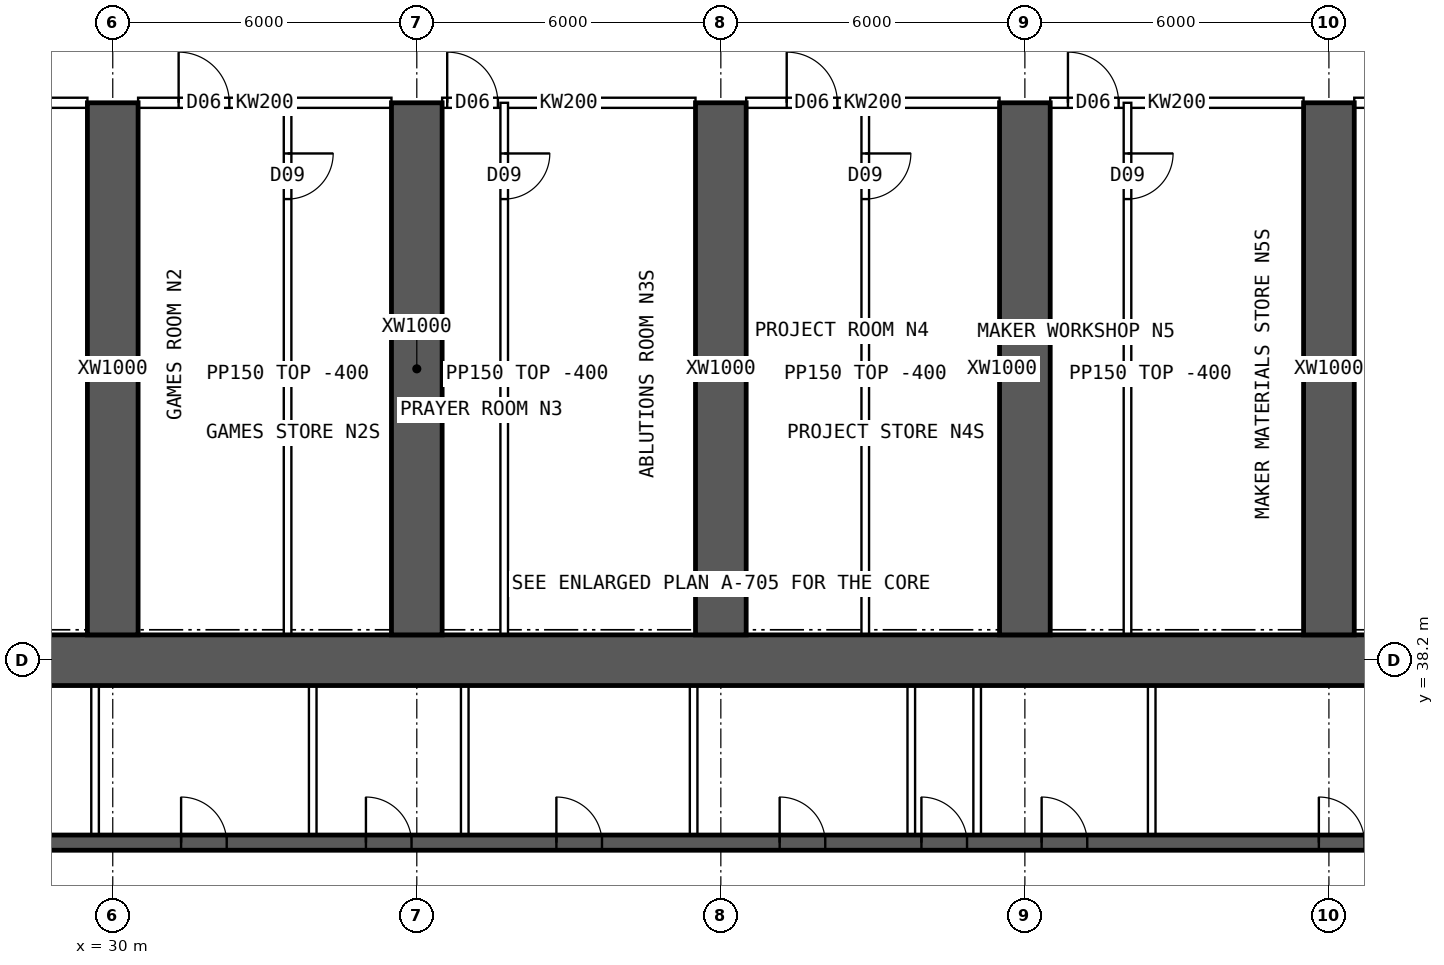
"""IFC4 building model, lengths in metres.
Left out: names, types, materials, properties, quantities, classifications, styles, units other than length and angle.
Written with IfcOpenShell. Run it as: python <this file> out.ifc"""

import sys

from ifc_helpers import new_model, si_unit, direction, frame, frame_2d, origin, place, context, subcontext, project, spatial, rectangle, extrude, element, fill, save


model = new_model("IFC4")
c1 = context("Model", 3, precision=1e-05, world=origin(), true_north=direction((0.0, 1.0)))
c2 = subcontext(c1, "Body", "Model", "MODEL_VIEW")
j1 = project(units=[si_unit("LENGTHUNIT", "METRE"), si_unit("PLANEANGLEUNIT", "RADIAN")], contexts=[c1])
p1 = place(None, origin())
s1 = spatial("IfcSite", under=j1, at=p1, CompositionType="ELEMENT")
p2 = place(p1, origin())
s2 = spatial("IfcBuilding", under=s1, at=p2, CompositionType="ELEMENT")
p3 = place(p2, frame((0.0, 0.0, 11.0)))
s3 = spatial("IfcBuildingStorey", under=s2, at=p3, CompositionType="ELEMENT", Elevation=11.0)
p4 = place(p3, frame((18.0, 38.2, 0.0), z_axis=(0.0, 0.0, 1.0), x_axis=(1.0, 0.0, 0.0)))
e1 = element("IfcWall", 1, at=p4, inside=s3, PredefinedType="SHEAR", context=c2, shape_type="SweptSolid", body=[
    extrude(rectangle(XDim=48.0, YDim=1.0, at=frame_2d((24.0, 0.0))), origin(), (0.0, 0.0, 1.0), 5.0),
])
p5 = place(p3, frame((18.5, 34.6, 0.0), z_axis=(0.0, 0.0, 1.0), x_axis=(1.0, 0.0, 0.0)))
e2 = element("IfcWall", 2, at=p5, inside=s3, PredefinedType="SHEAR", context=c2, shape_type="SweptSolid", body=[
    extrude(rectangle(XDim=47.0, YDim=0.3, at=frame_2d((23.5, 0.0))), origin(), (0.0, 0.0, 1.0), 5.0),
])
p6 = place(p5, frame((0.9, 0.0, 0.0)))
e3 = element("IfcOpeningElement", 3, at=p6, cuts=e2, PredefinedType="OPENING", context=c2, shape_type="SweptSolid", body=[
    extrude(rectangle(XDim=1.1, YDim=2.1, at=frame_2d((0.55, 1.05))), frame((0.0, 0.16, 0.0), z_axis=(0.0, -1.0, 0.0), x_axis=(1.0, 0.0, 0.0)), (0.0, 0.0, 1.0), 0.32),
])
p7 = place(p5, frame((45.0, 0.0, 0.0)))
e4 = element("IfcOpeningElement", 4, at=p7, cuts=e2, PredefinedType="OPENING", context=c2, shape_type="SweptSolid", body=[
    extrude(rectangle(XDim=1.1, YDim=2.1, at=frame_2d((0.55, 1.05))), frame((0.0, 0.16, 0.0), z_axis=(0.0, -1.0, 0.0), x_axis=(1.0, 0.0, 0.0)), (0.0, 0.0, 1.0), 0.32),
])
p8 = place(p5, frame((4.1, 0.0, 0.0)))
e5 = element("IfcOpeningElement", 5, at=p8, cuts=e2, PredefinedType="OPENING", context=c2, shape_type="SweptSolid", body=[
    extrude(rectangle(XDim=0.9, YDim=2.1, at=frame_2d((0.45, 1.05))), frame((0.0, 0.16, 0.0), z_axis=(0.0, -1.0, 0.0), x_axis=(1.0, 0.0, 0.0)), (0.0, 0.0, 1.0), 0.32),
])
p9 = place(p5, frame((42.0, 0.0, 0.0)))
e6 = element("IfcOpeningElement", 6, at=p9, cuts=e2, PredefinedType="OPENING", context=c2, shape_type="SweptSolid", body=[
    extrude(rectangle(XDim=0.9, YDim=2.1, at=frame_2d((0.45, 1.05))), frame((0.0, 0.16, 0.0), z_axis=(0.0, -1.0, 0.0), x_axis=(1.0, 0.0, 0.0)), (0.0, 0.0, 1.0), 0.32),
])
p10 = place(p5, frame((8.875, 0.0, 0.0)))
e7 = element("IfcOpeningElement", 7, at=p10, cuts=e2, PredefinedType="OPENING", context=c2, shape_type="SweptSolid", body=[
    extrude(rectangle(XDim=0.9, YDim=2.1, at=frame_2d((0.45, 1.05))), frame((0.0, 0.16, 0.0), z_axis=(0.0, -1.0, 0.0), x_axis=(1.0, 0.0, 0.0)), (0.0, 0.0, 1.0), 0.32),
])
p11 = place(p5, frame((12.849, 0.0, 0.0)))
e8 = element("IfcOpeningElement", 8, at=p11, cuts=e2, PredefinedType="OPENING", context=c2, shape_type="SweptSolid", body=[
    extrude(rectangle(XDim=0.9, YDim=2.1, at=frame_2d((0.45, 1.05))), frame((0.0, 0.16, 0.0), z_axis=(0.0, -1.0, 0.0), x_axis=(1.0, 0.0, 0.0)), (0.0, 0.0, 1.0), 0.32),
])
p12 = place(p5, frame((16.496, 0.0, 0.0)))
e9 = element("IfcOpeningElement", 9, at=p12, cuts=e2, PredefinedType="OPENING", context=c2, shape_type="SweptSolid", body=[
    extrude(rectangle(XDim=0.9, YDim=2.1, at=frame_2d((0.45, 1.05))), frame((0.0, 0.16, 0.0), z_axis=(0.0, -1.0, 0.0), x_axis=(1.0, 0.0, 0.0)), (0.0, 0.0, 1.0), 0.32),
])
p13 = place(p5, frame((20.255, 0.0, 0.0)))
e10 = element("IfcOpeningElement", 10, at=p13, cuts=e2, PredefinedType="OPENING", context=c2, shape_type="SweptSolid", body=[
    extrude(rectangle(XDim=0.9, YDim=2.1, at=frame_2d((0.45, 1.05))), frame((0.0, 0.16, 0.0), z_axis=(0.0, -1.0, 0.0), x_axis=(1.0, 0.0, 0.0)), (0.0, 0.0, 1.0), 0.32),
])
p14 = place(p5, frame((24.661, 0.0, 0.0)))
e11 = element("IfcOpeningElement", 11, at=p14, cuts=e2, PredefinedType="OPENING", context=c2, shape_type="SweptSolid", body=[
    extrude(rectangle(XDim=0.9, YDim=2.1, at=frame_2d((0.45, 1.05))), frame((0.0, 0.16, 0.0), z_axis=(0.0, -1.0, 0.0), x_axis=(1.0, 0.0, 0.0)), (0.0, 0.0, 1.0), 0.32),
])
p15 = place(p5, frame((27.458, 0.0, 0.0)))
e12 = element("IfcOpeningElement", 12, at=p15, cuts=e2, PredefinedType="OPENING", context=c2, shape_type="SweptSolid", body=[
    extrude(rectangle(XDim=0.9, YDim=2.1, at=frame_2d((0.45, 1.05))), frame((0.0, 0.16, 0.0), z_axis=(0.0, -1.0, 0.0), x_axis=(1.0, 0.0, 0.0)), (0.0, 0.0, 1.0), 0.32),
])
p16 = place(p5, frame((29.831, 0.0, 0.0)))
e13 = element("IfcOpeningElement", 13, at=p16, cuts=e2, PredefinedType="OPENING", context=c2, shape_type="SweptSolid", body=[
    extrude(rectangle(XDim=0.9, YDim=2.1, at=frame_2d((0.45, 1.05))), frame((0.0, 0.16, 0.0), z_axis=(0.0, -1.0, 0.0), x_axis=(1.0, 0.0, 0.0)), (0.0, 0.0, 1.0), 0.32),
])
p17 = place(p5, frame((35.302, 0.0, 0.0)))
e14 = element("IfcOpeningElement", 14, at=p17, cuts=e2, PredefinedType="OPENING", context=c2, shape_type="SweptSolid", body=[
    extrude(rectangle(XDim=0.9, YDim=2.1, at=frame_2d((0.45, 1.05))), frame((0.0, 0.16, 0.0), z_axis=(0.0, -1.0, 0.0), x_axis=(1.0, 0.0, 0.0)), (0.0, 0.0, 1.0), 0.32),
])
for number, where, z_axis, x_axis in (
    (15, (30.0, 38.7, 0.0), (0.0, 0.0, 1.0), (0.0, 1.0, 0.0)),
    (16, (36.0, 38.7, 0.0), (0.0, 0.0, 1.0), (0.0, 1.0, 0.0)),
    (17, (42.0, 38.7, 0.0), (0.0, 0.0, 1.0), (0.0, 1.0, 0.0)),
    (18, (48.0, 38.7, 0.0), (0.0, 0.0, 1.0), (0.0, 1.0, 0.0)),
    (19, (54.0, 38.7, 0.0), (0.0, 0.0, 1.0), (0.0, 1.0, 0.0)),
):
    element("IfcWall", number, at=place(p3, frame(where, z_axis=z_axis, x_axis=x_axis)), inside=s3, PredefinedType="SHEAR", context=c2, shape_type="SweptSolid", body=[
        extrude(rectangle(XDim=10.5, YDim=1.0, at=frame_2d((5.25, 0.0))), origin(), (0.0, 0.0, 1.0), 5.0),
    ])
for number, where, z_axis, x_axis in (
    (20, (29.651, 34.75, 0.0), (0.0, 0.0, 1.0), (0.0, 1.0, 0.0)),
    (21, (33.946, 34.75, 0.0), (0.0, 0.0, 1.0), (0.0, 1.0, 0.0)),
    (22, (36.946, 34.75, 0.0), (0.0, 0.0, 1.0), (0.0, 1.0, 0.0)),
    (23, (41.463, 34.75, 0.0), (0.0, 0.0, 1.0), (0.0, 1.0, 0.0)),
    (24, (45.758, 34.75, 0.0), (0.0, 0.0, 1.0), (0.0, 1.0, 0.0)),
    (25, (47.058, 34.75, 0.0), (0.0, 0.0, 1.0), (0.0, 1.0, 0.0)),
    (26, (50.503, 34.75, 0.0), (0.0, 0.0, 1.0), (0.0, 1.0, 0.0)),
):
    element("IfcWall", number, at=place(p3, frame(where, z_axis=z_axis, x_axis=x_axis)), inside=s3, PredefinedType="SOLIDWALL", context=c2, shape_type="SweptSolid", body=[
        extrude(rectangle(XDim=2.95, YDim=0.15, at=frame_2d((1.475, 0.0))), origin(), (0.0, 0.0, 1.0), 4.6),
    ])
p18 = place(p3, frame((33.45, 38.5, 0.0), z_axis=(0.0, 0.0, 1.0), x_axis=(0.0, 1.0, 0.0)))
e27 = element("IfcWall", 27, at=p18, inside=s3, PredefinedType="PARTITIONING", context=c2, shape_type="SweptSolid", body=[
    extrude(rectangle(XDim=10.7, YDim=0.15, at=frame_2d((5.35, 0.0))), origin(), (0.0, 0.0, 1.0), 4.6),
])
p19 = place(p18, frame((8.8, 0.0, 0.0)))
e28 = element("IfcOpeningElement", 28, at=p19, cuts=e27, PredefinedType="OPENING", context=c2, shape_type="SweptSolid", body=[
    extrude(rectangle(XDim=0.9, YDim=2.1, at=frame_2d((0.45, 1.05))), frame((0.0, 0.085, 0.0), z_axis=(0.0, -1.0, 0.0), x_axis=(1.0, 0.0, 0.0)), (0.0, 0.0, 1.0), 0.17),
])
p20 = place(p3, frame((37.725, 38.5, 0.0), z_axis=(0.0, 0.0, 1.0), x_axis=(0.0, 1.0, 0.0)))
e29 = element("IfcWall", 29, at=p20, inside=s3, PredefinedType="PARTITIONING", context=c2, shape_type="SweptSolid", body=[
    extrude(rectangle(XDim=10.7, YDim=0.15, at=frame_2d((5.35, 0.0))), origin(), (0.0, 0.0, 1.0), 4.6),
])
p21 = place(p20, frame((8.8, 0.0, 0.0)))
e30 = element("IfcOpeningElement", 30, at=p21, cuts=e29, PredefinedType="OPENING", context=c2, shape_type="SweptSolid", body=[
    extrude(rectangle(XDim=0.9, YDim=2.1, at=frame_2d((0.45, 1.05))), frame((0.0, 0.085, 0.0), z_axis=(0.0, -1.0, 0.0), x_axis=(1.0, 0.0, 0.0)), (0.0, 0.0, 1.0), 0.17),
])
p22 = place(p3, frame((44.85, 38.5, 0.0), z_axis=(0.0, 0.0, 1.0), x_axis=(0.0, 1.0, 0.0)))
e31 = element("IfcWall", 31, at=p22, inside=s3, PredefinedType="PARTITIONING", context=c2, shape_type="SweptSolid", body=[
    extrude(rectangle(XDim=10.7, YDim=0.15, at=frame_2d((5.35, 0.0))), origin(), (0.0, 0.0, 1.0), 4.6),
])
p23 = place(p22, frame((8.8, 0.0, 0.0)))
e32 = element("IfcOpeningElement", 32, at=p23, cuts=e31, PredefinedType="OPENING", context=c2, shape_type="SweptSolid", body=[
    extrude(rectangle(XDim=0.9, YDim=2.1, at=frame_2d((0.45, 1.05))), frame((0.0, 0.085, 0.0), z_axis=(0.0, -1.0, 0.0), x_axis=(1.0, 0.0, 0.0)), (0.0, 0.0, 1.0), 0.17),
])
p24 = place(p3, frame((50.025, 38.5, 0.0), z_axis=(0.0, 0.0, 1.0), x_axis=(0.0, 1.0, 0.0)))
e33 = element("IfcWall", 33, at=p24, inside=s3, PredefinedType="PARTITIONING", context=c2, shape_type="SweptSolid", body=[
    extrude(rectangle(XDim=10.7, YDim=0.15, at=frame_2d((5.35, 0.0))), origin(), (0.0, 0.0, 1.0), 4.6),
])
p25 = place(p24, frame((8.8, 0.0, 0.0)))
e34 = element("IfcOpeningElement", 34, at=p25, cuts=e33, PredefinedType="OPENING", context=c2, shape_type="SweptSolid", body=[
    extrude(rectangle(XDim=0.9, YDim=2.1, at=frame_2d((0.45, 1.05))), frame((0.0, 0.085, 0.0), z_axis=(0.0, -1.0, 0.0), x_axis=(1.0, 0.0, 0.0)), (0.0, 0.0, 1.0), 0.17),
])
p26 = place(p3, frame((24.5, 49.2, 0.0), z_axis=(0.0, 0.0, 1.0), x_axis=(1.0, 0.0, 0.0)))
e35 = element("IfcWall", 35, at=p26, inside=s3, PredefinedType="SOLIDWALL", context=c2, shape_type="SweptSolid", body=[
    extrude(rectangle(XDim=5.0, YDim=0.2, at=frame_2d((2.5, 0.0))), origin(), (0.0, 0.0, 1.0), 4.6),
])
p27 = place(p26, frame((0.575, 0.0, 0.0)))
e36 = element("IfcOpeningElement", 36, at=p27, cuts=e35, PredefinedType="OPENING", context=c2, shape_type="SweptSolid", body=[
    extrude(rectangle(XDim=1.0, YDim=2.1, at=frame_2d((0.5, 1.05))), frame((0.0, 0.11, 0.0), z_axis=(0.0, -1.0, 0.0), x_axis=(1.0, 0.0, 0.0)), (0.0, 0.0, 1.0), 0.22),
])
p28 = place(p3, frame((30.5, 49.2, 0.0), z_axis=(0.0, 0.0, 1.0), x_axis=(1.0, 0.0, 0.0)))
e37 = element("IfcWall", 37, at=p28, inside=s3, PredefinedType="SOLIDWALL", context=c2, shape_type="SweptSolid", body=[
    extrude(rectangle(XDim=5.0, YDim=0.2, at=frame_2d((2.5, 0.0))), origin(), (0.0, 0.0, 1.0), 4.6),
])
p29 = place(p28, frame((0.8, 0.0, 0.0)))
e38 = element("IfcOpeningElement", 38, at=p29, cuts=e37, PredefinedType="OPENING", context=c2, shape_type="SweptSolid", body=[
    extrude(rectangle(XDim=1.0, YDim=2.1, at=frame_2d((0.5, 1.05))), frame((0.0, 0.11, 0.0), z_axis=(0.0, -1.0, 0.0), x_axis=(1.0, 0.0, 0.0)), (0.0, 0.0, 1.0), 0.22),
])
p30 = place(p3, frame((36.5, 49.2, 0.0), z_axis=(0.0, 0.0, 1.0), x_axis=(1.0, 0.0, 0.0)))
e39 = element("IfcWall", 39, at=p30, inside=s3, PredefinedType="SOLIDWALL", context=c2, shape_type="SweptSolid", body=[
    extrude(rectangle(XDim=5.0, YDim=0.2, at=frame_2d((2.5, 0.0))), origin(), (0.0, 0.0, 1.0), 4.6),
])
p31 = place(p30, frame((0.1, 0.0, 0.0)))
e40 = element("IfcOpeningElement", 40, at=p31, cuts=e39, PredefinedType="OPENING", context=c2, shape_type="SweptSolid", body=[
    extrude(rectangle(XDim=1.0, YDim=2.1, at=frame_2d((0.5, 1.05))), frame((0.0, 0.11, 0.0), z_axis=(0.0, -1.0, 0.0), x_axis=(1.0, 0.0, 0.0)), (0.0, 0.0, 1.0), 0.22),
])
p32 = place(p3, frame((42.5, 49.2, 0.0), z_axis=(0.0, 0.0, 1.0), x_axis=(1.0, 0.0, 0.0)))
e41 = element("IfcWall", 41, at=p32, inside=s3, PredefinedType="SOLIDWALL", context=c2, shape_type="SweptSolid", body=[
    extrude(rectangle(XDim=5.0, YDim=0.2, at=frame_2d((2.5, 0.0))), origin(), (0.0, 0.0, 1.0), 4.6),
])
p33 = place(p32, frame((0.8, 0.0, 0.0)))
e42 = element("IfcOpeningElement", 42, at=p33, cuts=e41, PredefinedType="OPENING", context=c2, shape_type="SweptSolid", body=[
    extrude(rectangle(XDim=1.0, YDim=2.1, at=frame_2d((0.5, 1.05))), frame((0.0, 0.11, 0.0), z_axis=(0.0, -1.0, 0.0), x_axis=(1.0, 0.0, 0.0)), (0.0, 0.0, 1.0), 0.22),
])
p34 = place(p3, frame((48.5, 49.2, 0.0), z_axis=(0.0, 0.0, 1.0), x_axis=(1.0, 0.0, 0.0)))
e43 = element("IfcWall", 43, at=p34, inside=s3, PredefinedType="SOLIDWALL", context=c2, shape_type="SweptSolid", body=[
    extrude(rectangle(XDim=5.0, YDim=0.2, at=frame_2d((2.5, 0.0))), origin(), (0.0, 0.0, 1.0), 4.6),
])
p35 = place(p34, frame((0.35, 0.0, 0.0)))
e44 = element("IfcOpeningElement", 44, at=p35, cuts=e43, PredefinedType="OPENING", context=c2, shape_type="SweptSolid", body=[
    extrude(rectangle(XDim=1.0, YDim=2.1, at=frame_2d((0.5, 1.05))), frame((0.0, 0.11, 0.0), z_axis=(0.0, -1.0, 0.0), x_axis=(1.0, 0.0, 0.0)), (0.0, 0.0, 1.0), 0.22),
])
p36 = place(p3, frame((54.5, 49.2, 0.0), z_axis=(0.0, 0.0, 1.0), x_axis=(1.0, 0.0, 0.0)))
e45 = element("IfcWall", 45, at=p36, inside=s3, PredefinedType="SOLIDWALL", context=c2, shape_type="SweptSolid", body=[
    extrude(rectangle(XDim=5.0, YDim=0.2, at=frame_2d((2.5, 0.0))), origin(), (0.0, 0.0, 1.0), 4.6),
])
p37 = place(p36, frame((0.8, 0.0, 0.0)))
e46 = element("IfcOpeningElement", 46, at=p37, cuts=e45, PredefinedType="OPENING", context=c2, shape_type="SweptSolid", body=[
    extrude(rectangle(XDim=1.0, YDim=2.1, at=frame_2d((0.5, 1.05))), frame((0.0, 0.11, 0.0), z_axis=(0.0, -1.0, 0.0), x_axis=(1.0, 0.0, 0.0)), (0.0, 0.0, 1.0), 0.22),
])
p38 = place(p11, origin())
e47 = element("IfcDoor", 47, at=p38, inside=s3, OperationType="SINGLE_SWING_LEFT", PredefinedType="DOOR", context=c2, shape_type="SweptSolid", body=[
    extrude(rectangle(XDim=0.9, YDim=2.1, at=frame_2d((0.45, 1.05))), frame((0.0, 0.025, 0.0), z_axis=(0.0, -1.0, 0.0), x_axis=(1.0, 0.0, 0.0)), (0.0, 0.0, 1.0), 0.05),
])
fill(e8, e47)
p39 = place(p12, origin())
e48 = element("IfcDoor", 48, at=p39, inside=s3, OperationType="SINGLE_SWING_LEFT", PredefinedType="DOOR", context=c2, shape_type="SweptSolid", body=[
    extrude(rectangle(XDim=0.9, YDim=2.1, at=frame_2d((0.45, 1.05))), frame((0.0, 0.025, 0.0), z_axis=(0.0, -1.0, 0.0), x_axis=(1.0, 0.0, 0.0)), (0.0, 0.0, 1.0), 0.05),
])
fill(e9, e48)
p40 = place(p13, origin())
e49 = element("IfcDoor", 49, at=p40, inside=s3, OperationType="SINGLE_SWING_LEFT", PredefinedType="DOOR", context=c2, shape_type="SweptSolid", body=[
    extrude(rectangle(XDim=0.9, YDim=2.1, at=frame_2d((0.45, 1.05))), frame((0.0, 0.025, 0.0), z_axis=(0.0, -1.0, 0.0), x_axis=(1.0, 0.0, 0.0)), (0.0, 0.0, 1.0), 0.05),
])
fill(e10, e49)
p41 = place(p14, origin())
e50 = element("IfcDoor", 50, at=p41, inside=s3, OperationType="SINGLE_SWING_LEFT", PredefinedType="DOOR", context=c2, shape_type="SweptSolid", body=[
    extrude(rectangle(XDim=0.9, YDim=2.1, at=frame_2d((0.45, 1.05))), frame((0.0, 0.025, 0.0), z_axis=(0.0, -1.0, 0.0), x_axis=(1.0, 0.0, 0.0)), (0.0, 0.0, 1.0), 0.05),
])
fill(e11, e50)
p42 = place(p15, origin())
e51 = element("IfcDoor", 51, at=p42, inside=s3, OperationType="SINGLE_SWING_LEFT", PredefinedType="DOOR", context=c2, shape_type="SweptSolid", body=[
    extrude(rectangle(XDim=0.9, YDim=2.1, at=frame_2d((0.45, 1.05))), frame((0.0, 0.025, 0.0), z_axis=(0.0, -1.0, 0.0), x_axis=(1.0, 0.0, 0.0)), (0.0, 0.0, 1.0), 0.05),
])
fill(e12, e51)
p43 = place(p16, origin())
e52 = element("IfcDoor", 52, at=p43, inside=s3, OperationType="SINGLE_SWING_LEFT", PredefinedType="DOOR", context=c2, shape_type="SweptSolid", body=[
    extrude(rectangle(XDim=0.9, YDim=2.1, at=frame_2d((0.45, 1.05))), frame((0.0, 0.025, 0.0), z_axis=(0.0, -1.0, 0.0), x_axis=(1.0, 0.0, 0.0)), (0.0, 0.0, 1.0), 0.05),
])
fill(e13, e52)
p44 = place(p17, origin())
e53 = element("IfcDoor", 53, at=p44, inside=s3, OperationType="SINGLE_SWING_LEFT", PredefinedType="DOOR", context=c2, shape_type="SweptSolid", body=[
    extrude(rectangle(XDim=0.9, YDim=2.1, at=frame_2d((0.45, 1.05))), frame((0.0, 0.025, 0.0), z_axis=(0.0, -1.0, 0.0), x_axis=(1.0, 0.0, 0.0)), (0.0, 0.0, 1.0), 0.05),
])
fill(e14, e53)
p45 = place(p19, origin())
e54 = element("IfcDoor", 54, at=p45, inside=s3, OperationType="SINGLE_SWING_RIGHT", PredefinedType="DOOR", context=c2, shape_type="SweptSolid", body=[
    extrude(rectangle(XDim=0.9, YDim=2.1, at=frame_2d((0.45, 1.05))), frame((0.0, 0.025, 0.0), z_axis=(0.0, -1.0, 0.0), x_axis=(1.0, 0.0, 0.0)), (0.0, 0.0, 1.0), 0.05),
])
fill(e28, e54)
p46 = place(p21, origin())
e55 = element("IfcDoor", 55, at=p46, inside=s3, OperationType="SINGLE_SWING_RIGHT", PredefinedType="DOOR", context=c2, shape_type="SweptSolid", body=[
    extrude(rectangle(XDim=0.9, YDim=2.1, at=frame_2d((0.45, 1.05))), frame((0.0, 0.025, 0.0), z_axis=(0.0, -1.0, 0.0), x_axis=(1.0, 0.0, 0.0)), (0.0, 0.0, 1.0), 0.05),
])
fill(e30, e55)
p47 = place(p23, origin())
e56 = element("IfcDoor", 56, at=p47, inside=s3, OperationType="SINGLE_SWING_RIGHT", PredefinedType="DOOR", context=c2, shape_type="SweptSolid", body=[
    extrude(rectangle(XDim=0.9, YDim=2.1, at=frame_2d((0.45, 1.05))), frame((0.0, 0.025, 0.0), z_axis=(0.0, -1.0, 0.0), x_axis=(1.0, 0.0, 0.0)), (0.0, 0.0, 1.0), 0.05),
])
fill(e32, e56)
p48 = place(p25, origin())
e57 = element("IfcDoor", 57, at=p48, inside=s3, OperationType="SINGLE_SWING_RIGHT", PredefinedType="DOOR", context=c2, shape_type="SweptSolid", body=[
    extrude(rectangle(XDim=0.9, YDim=2.1, at=frame_2d((0.45, 1.05))), frame((0.0, 0.025, 0.0), z_axis=(0.0, -1.0, 0.0), x_axis=(1.0, 0.0, 0.0)), (0.0, 0.0, 1.0), 0.05),
])
fill(e34, e57)
p49 = place(p29, origin())
e58 = element("IfcDoor", 58, at=p49, inside=s3, OperationType="SINGLE_SWING_LEFT", PredefinedType="DOOR", context=c2, shape_type="SweptSolid", body=[
    extrude(rectangle(XDim=1.0, YDim=2.1, at=frame_2d((0.5, 1.05))), frame((0.0, 0.025, 0.0), z_axis=(0.0, -1.0, 0.0), x_axis=(1.0, 0.0, 0.0)), (0.0, 0.0, 1.0), 0.05),
])
fill(e38, e58)
p50 = place(p31, origin())
e59 = element("IfcDoor", 59, at=p50, inside=s3, OperationType="SINGLE_SWING_LEFT", PredefinedType="DOOR", context=c2, shape_type="SweptSolid", body=[
    extrude(rectangle(XDim=1.0, YDim=2.1, at=frame_2d((0.5, 1.05))), frame((0.0, 0.025, 0.0), z_axis=(0.0, -1.0, 0.0), x_axis=(1.0, 0.0, 0.0)), (0.0, 0.0, 1.0), 0.05),
])
fill(e40, e59)
p51 = place(p33, origin())
e60 = element("IfcDoor", 60, at=p51, inside=s3, OperationType="SINGLE_SWING_LEFT", PredefinedType="DOOR", context=c2, shape_type="SweptSolid", body=[
    extrude(rectangle(XDim=1.0, YDim=2.1, at=frame_2d((0.5, 1.05))), frame((0.0, 0.025, 0.0), z_axis=(0.0, -1.0, 0.0), x_axis=(1.0, 0.0, 0.0)), (0.0, 0.0, 1.0), 0.05),
])
fill(e42, e60)
p52 = place(p35, origin())
e61 = element("IfcDoor", 61, at=p52, inside=s3, OperationType="SINGLE_SWING_LEFT", PredefinedType="DOOR", context=c2, shape_type="SweptSolid", body=[
    extrude(rectangle(XDim=1.0, YDim=2.1, at=frame_2d((0.5, 1.05))), frame((0.0, 0.025, 0.0), z_axis=(0.0, -1.0, 0.0), x_axis=(1.0, 0.0, 0.0)), (0.0, 0.0, 1.0), 0.05),
])
fill(e44, e61)
save(model, sys.argv[1])
